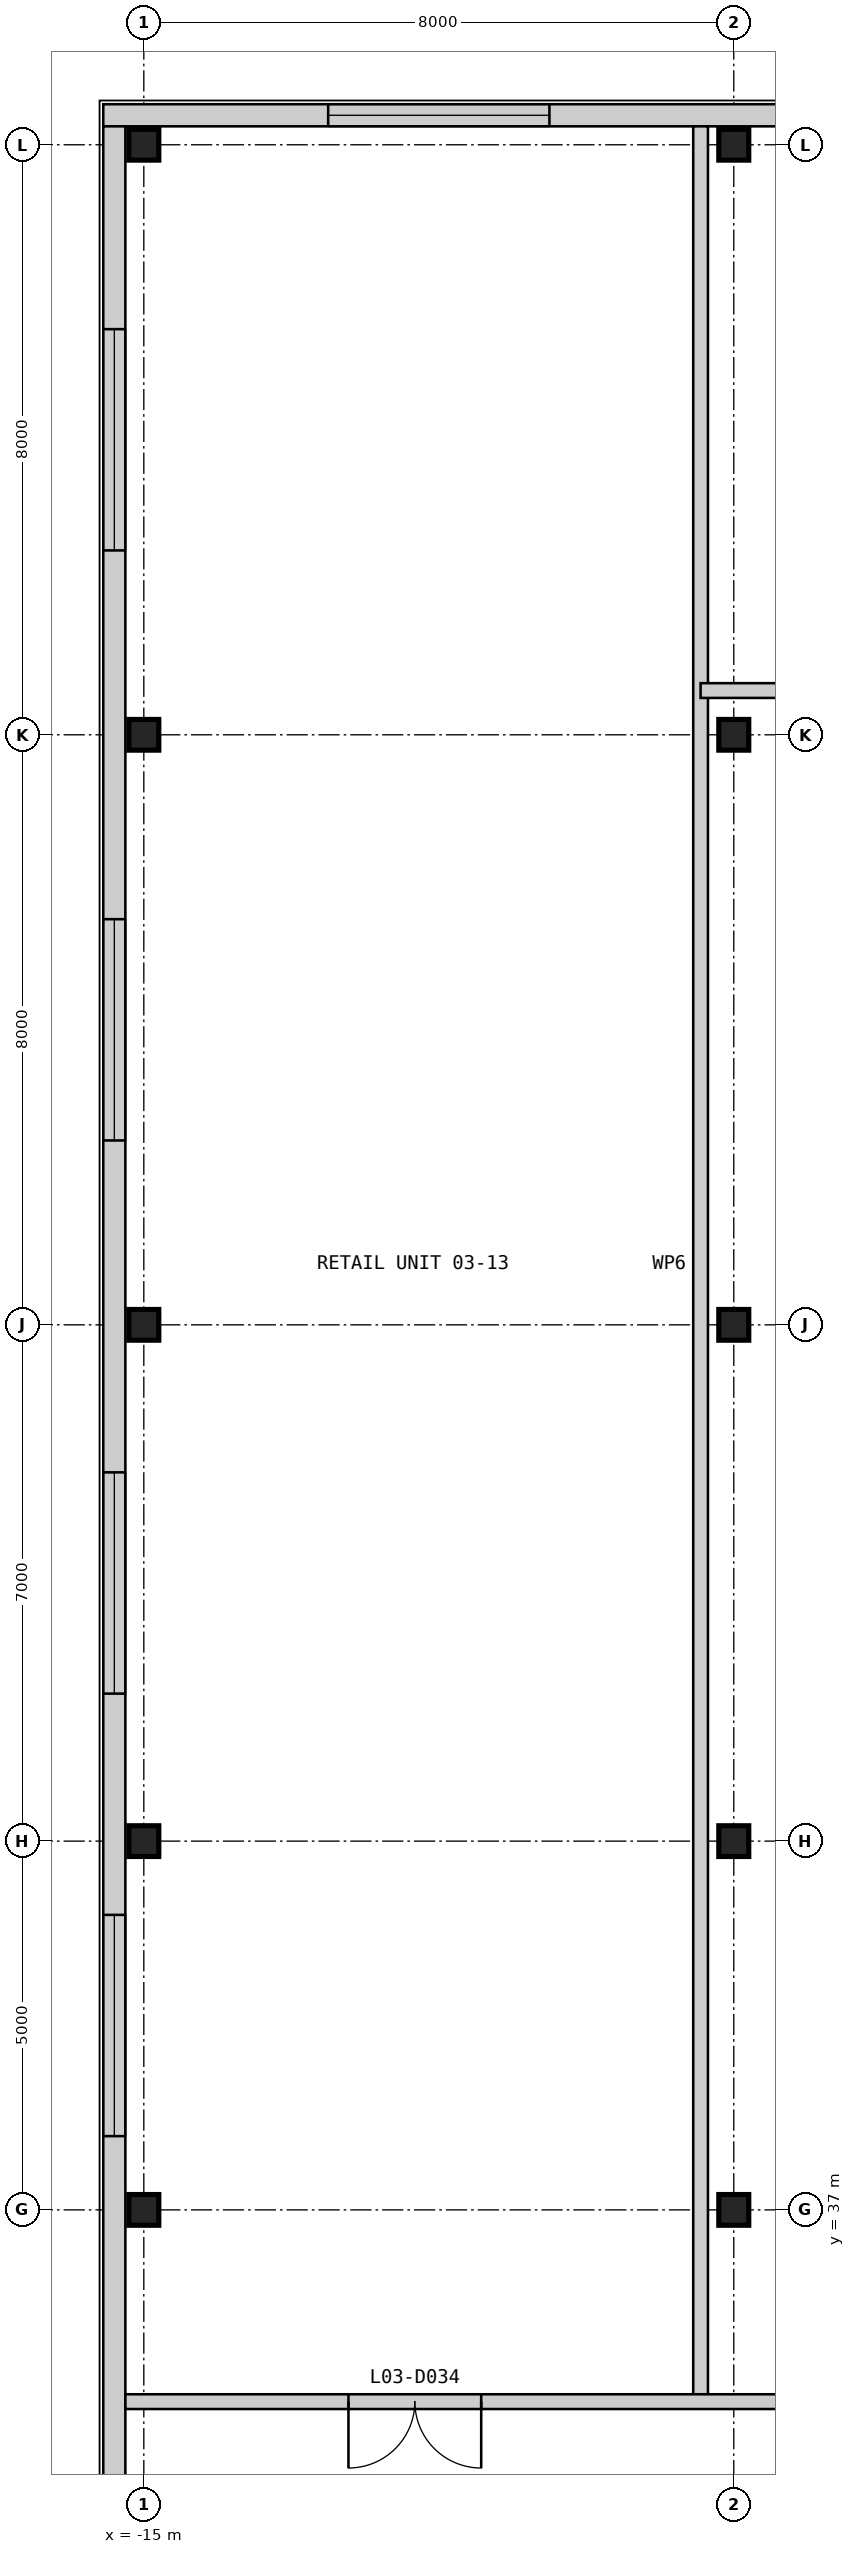
"""IFC4 building model, lengths in metres.
Left out: names, types, materials, properties, quantities, classifications, styles, units other than length and angle.
Written with IfcOpenShell. Run it as: python <this file> out.ifc"""

import sys

from ifc_helpers import new_model, si_unit, direction, frame, frame_2d, origin, origin_2d, place, context, subcontext, project, spatial, rectangle, i_section, extrude, element, fill, save


model = new_model("IFC4")
c1 = context("Model", 3, precision=1e-05, world=origin(), true_north=direction((0.0, 1.0)))
c2 = subcontext(c1, "Body", "Model", "MODEL_VIEW")
j1 = project(units=[si_unit("LENGTHUNIT", "METRE"), si_unit("PLANEANGLEUNIT", "RADIAN")], contexts=[c1])
p1 = place(None, origin())
s1 = spatial("IfcSite", under=j1, at=p1, CompositionType="ELEMENT")
p2 = place(p1, origin())
s2 = spatial("IfcBuilding", under=s1, at=p2, CompositionType="ELEMENT")
p3 = place(p2, frame((0.0, 0.0, 16.6)))
s3 = spatial("IfcBuildingStorey", under=s2, at=p3, CompositionType="ELEMENT", Elevation=16.6)
for number, where, z_axis, x_axis in (
    (1, (-15.0, 37.0, 0.0), (0.0, 0.0, 1.0), (1.0, 0.0, 0.0)),
    (2, (-15.0, 42.0, 0.0), (0.0, 0.0, 1.0), (1.0, 0.0, 0.0)),
    (3, (-15.0, 49.0, 0.0), (0.0, 0.0, 1.0), (1.0, 0.0, 0.0)),
    (4, (-15.0, 57.0, 0.0), (0.0, 0.0, 1.0), (1.0, 0.0, 0.0)),
    (5, (-15.0, 65.0, 0.0), (0.0, 0.0, 1.0), (1.0, 0.0, 0.0)),
    (6, (-7.0, 37.0, 0.0), (0.0, 0.0, 1.0), (1.0, 0.0, 0.0)),
    (7, (-7.0, 42.0, 0.0), (0.0, 0.0, 1.0), (1.0, 0.0, 0.0)),
    (8, (-7.0, 49.0, 0.0), (0.0, 0.0, 1.0), (1.0, 0.0, 0.0)),
    (9, (-7.0, 57.0, 0.0), (0.0, 0.0, 1.0), (1.0, 0.0, 0.0)),
    (10, (-7.0, 65.0, 0.0), (0.0, 0.0, 1.0), (1.0, 0.0, 0.0)),
):
    element("IfcColumn", number, at=place(p3, frame(where, z_axis=z_axis, x_axis=x_axis)), inside=s3, PredefinedType="COLUMN", context=c2, shape_type="SweptSolid", body=[
        extrude(i_section(OverallWidth=0.406, OverallDepth=0.417, WebThickness=0.03, FlangeThickness=0.048, at=origin_2d()), origin(), (0.0, 0.0, 1.0), 4.8),
    ])
p4 = place(p3, frame((57.55, 65.4, 0.0), z_axis=(0.0, 0.0, 1.0), x_axis=(-1.0, 0.0, 0.0)))
e11 = element("IfcWall", 11, at=p4, inside=s3, PredefinedType="SOLIDWALL", context=c2, shape_type="SweptSolid", body=[
    extrude(rectangle(XDim=73.1, YDim=0.3, at=frame_2d((36.55, 0.0))), origin(), (0.0, 0.0, 1.0), 4.5),
])
p5 = place(p4, frame((67.05, 0.0, 0.9)))
e12 = element("IfcOpeningElement", 12, at=p5, cuts=e11, PredefinedType="OPENING", context=c2, shape_type="SweptSolid", body=[
    extrude(rectangle(XDim=3.0, YDim=2.4, at=frame_2d((1.5, 1.2))), frame((0.0, 0.16, 0.0), z_axis=(0.0, -1.0, 0.0), x_axis=(1.0, 0.0, 0.0)), (0.0, 0.0, 1.0), 0.32),
])
p6 = place(p4, frame((59.05, 0.0, 0.9)))
e13 = element("IfcOpeningElement", 13, at=p6, cuts=e11, PredefinedType="OPENING", context=c2, shape_type="SweptSolid", body=[
    extrude(rectangle(XDim=3.0, YDim=2.4, at=frame_2d((1.5, 1.2))), frame((0.0, 0.16, 0.0), z_axis=(0.0, -1.0, 0.0), x_axis=(1.0, 0.0, 0.0)), (0.0, 0.0, 1.0), 0.32),
])
p7 = place(p4, frame((51.05, 0.0, 0.9)))
e14 = element("IfcOpeningElement", 14, at=p7, cuts=e11, PredefinedType="OPENING", context=c2, shape_type="SweptSolid", body=[
    extrude(rectangle(XDim=3.0, YDim=2.4, at=frame_2d((1.5, 1.2))), frame((0.0, 0.16, 0.0), z_axis=(0.0, -1.0, 0.0), x_axis=(1.0, 0.0, 0.0)), (0.0, 0.0, 1.0), 0.32),
])
p8 = place(p4, frame((37.05, 0.0, 0.9)))
e15 = element("IfcOpeningElement", 15, at=p8, cuts=e11, PredefinedType="OPENING", context=c2, shape_type="SweptSolid", body=[
    extrude(rectangle(XDim=3.0, YDim=2.4, at=frame_2d((1.5, 1.2))), frame((0.0, 0.16, 0.0), z_axis=(0.0, -1.0, 0.0), x_axis=(1.0, 0.0, 0.0)), (0.0, 0.0, 1.0), 0.32),
])
p9 = place(p4, frame((25.05, 0.0, 0.9)))
e16 = element("IfcOpeningElement", 16, at=p9, cuts=e11, PredefinedType="OPENING", context=c2, shape_type="SweptSolid", body=[
    extrude(rectangle(XDim=3.0, YDim=2.4, at=frame_2d((1.5, 1.2))), frame((0.0, 0.16, 0.0), z_axis=(0.0, -1.0, 0.0), x_axis=(1.0, 0.0, 0.0)), (0.0, 0.0, 1.0), 0.32),
])
p10 = place(p4, frame((16.55, 0.0, 0.9)))
e17 = element("IfcOpeningElement", 17, at=p10, cuts=e11, PredefinedType="OPENING", context=c2, shape_type="SweptSolid", body=[
    extrude(rectangle(XDim=3.0, YDim=2.4, at=frame_2d((1.5, 1.2))), frame((0.0, 0.16, 0.0), z_axis=(0.0, -1.0, 0.0), x_axis=(1.0, 0.0, 0.0)), (0.0, 0.0, 1.0), 0.32),
])
p11 = place(p4, frame((10.55, 0.0, 0.9)))
e18 = element("IfcOpeningElement", 18, at=p11, cuts=e11, PredefinedType="OPENING", context=c2, shape_type="SweptSolid", body=[
    extrude(rectangle(XDim=3.0, YDim=2.4, at=frame_2d((1.5, 1.2))), frame((0.0, 0.16, 0.0), z_axis=(0.0, -1.0, 0.0), x_axis=(1.0, 0.0, 0.0)), (0.0, 0.0, 1.0), 0.32),
])
p12 = place(p4, frame((3.05, 0.0, 0.9)))
e19 = element("IfcOpeningElement", 19, at=p12, cuts=e11, PredefinedType="OPENING", context=c2, shape_type="SweptSolid", body=[
    extrude(rectangle(XDim=3.0, YDim=2.4, at=frame_2d((1.5, 1.2))), frame((0.0, 0.16, 0.0), z_axis=(0.0, -1.0, 0.0), x_axis=(1.0, 0.0, 0.0)), (0.0, 0.0, 1.0), 0.32),
])
p13 = place(p3, frame((-15.4, 65.25, 0.0), z_axis=(0.0, 0.0, 1.0), x_axis=(0.0, -1.0, 0.0)))
e20 = element("IfcWall", 20, at=p13, inside=s3, PredefinedType="SOLIDWALL", context=c2, shape_type="SweptSolid", body=[
    extrude(rectangle(XDim=72.5, YDim=0.3, at=frame_2d((36.25, 0.0))), origin(), (0.0, 0.0, 1.0), 4.5),
])
p14 = place(p13, frame((66.75, 0.0, 0.9)))
e21 = element("IfcOpeningElement", 21, at=p14, cuts=e20, PredefinedType="OPENING", context=c2, shape_type="SweptSolid", body=[
    extrude(rectangle(XDim=3.0, YDim=2.4, at=frame_2d((1.5, 1.2))), frame((0.0, 0.16, 0.0), z_axis=(0.0, -1.0, 0.0), x_axis=(1.0, 0.0, 0.0)), (0.0, 0.0, 1.0), 0.32),
])
p15 = place(p13, frame((58.75, 0.0, 0.9)))
e22 = element("IfcOpeningElement", 22, at=p15, cuts=e20, PredefinedType="OPENING", context=c2, shape_type="SweptSolid", body=[
    extrude(rectangle(XDim=3.0, YDim=2.4, at=frame_2d((1.5, 1.2))), frame((0.0, 0.16, 0.0), z_axis=(0.0, -1.0, 0.0), x_axis=(1.0, 0.0, 0.0)), (0.0, 0.0, 1.0), 0.32),
])
p16 = place(p13, frame((44.75, 0.0, 0.9)))
e23 = element("IfcOpeningElement", 23, at=p16, cuts=e20, PredefinedType="OPENING", context=c2, shape_type="SweptSolid", body=[
    extrude(rectangle(XDim=3.0, YDim=2.4, at=frame_2d((1.5, 1.2))), frame((0.0, 0.16, 0.0), z_axis=(0.0, -1.0, 0.0), x_axis=(1.0, 0.0, 0.0)), (0.0, 0.0, 1.0), 0.32),
])
p17 = place(p13, frame((32.75, 0.0, 0.9)))
e24 = element("IfcOpeningElement", 24, at=p17, cuts=e20, PredefinedType="OPENING", context=c2, shape_type="SweptSolid", body=[
    extrude(rectangle(XDim=3.0, YDim=2.4, at=frame_2d((1.5, 1.2))), frame((0.0, 0.16, 0.0), z_axis=(0.0, -1.0, 0.0), x_axis=(1.0, 0.0, 0.0)), (0.0, 0.0, 1.0), 0.32),
])
p18 = place(p13, frame((24.25, 0.0, 0.9)))
e25 = element("IfcOpeningElement", 25, at=p18, cuts=e20, PredefinedType="OPENING", context=c2, shape_type="SweptSolid", body=[
    extrude(rectangle(XDim=3.0, YDim=2.4, at=frame_2d((1.5, 1.2))), frame((0.0, 0.16, 0.0), z_axis=(0.0, -1.0, 0.0), x_axis=(1.0, 0.0, 0.0)), (0.0, 0.0, 1.0), 0.32),
])
p19 = place(p13, frame((18.25, 0.0, 0.9)))
e26 = element("IfcOpeningElement", 26, at=p19, cuts=e20, PredefinedType="OPENING", context=c2, shape_type="SweptSolid", body=[
    extrude(rectangle(XDim=3.0, YDim=2.4, at=frame_2d((1.5, 1.2))), frame((0.0, 0.16, 0.0), z_axis=(0.0, -1.0, 0.0), x_axis=(1.0, 0.0, 0.0)), (0.0, 0.0, 1.0), 0.32),
])
p20 = place(p13, frame((10.75, 0.0, 0.9)))
e27 = element("IfcOpeningElement", 27, at=p20, cuts=e20, PredefinedType="OPENING", context=c2, shape_type="SweptSolid", body=[
    extrude(rectangle(XDim=3.0, YDim=2.4, at=frame_2d((1.5, 1.2))), frame((0.0, 0.16, 0.0), z_axis=(0.0, -1.0, 0.0), x_axis=(1.0, 0.0, 0.0)), (0.0, 0.0, 1.0), 0.32),
])
p21 = place(p13, frame((2.75, 0.0, 0.9)))
e28 = element("IfcOpeningElement", 28, at=p21, cuts=e20, PredefinedType="OPENING", context=c2, shape_type="SweptSolid", body=[
    extrude(rectangle(XDim=3.0, YDim=2.4, at=frame_2d((1.5, 1.2))), frame((0.0, 0.16, 0.0), z_axis=(0.0, -1.0, 0.0), x_axis=(1.0, 0.0, 0.0)), (0.0, 0.0, 1.0), 0.32),
])
p22 = place(p3, frame((-7.45, 34.4, 0.0), z_axis=(0.0, 0.0, 1.0), x_axis=(0.0, 1.0, 0.0)))
e29 = element("IfcWall", 29, at=p22, inside=s3, PredefinedType="PARTITIONING", context=c2, shape_type="SweptSolid", body=[
    extrude(rectangle(XDim=30.85, YDim=0.2, at=frame_2d((15.425, 0.0))), origin(), (0.0, 0.0, 1.0), 4.5),
])
p23 = place(p3, frame((-15.25, 34.4, 0.0), z_axis=(0.0, 0.0, 1.0), x_axis=(1.0, 0.0, 0.0)))
e30 = element("IfcWall", 30, at=p23, inside=s3, PredefinedType="PARTITIONING", context=c2, shape_type="SweptSolid", body=[
    extrude(rectangle(XDim=22.25, YDim=0.2, at=frame_2d((11.125, 0.0))), origin(), (0.0, 0.0, 1.0), 4.5),
])
p24 = place(p23, frame((17.525, 0.0, 0.0)))
e31 = element("IfcOpeningElement", 31, at=p24, cuts=e30, PredefinedType="OPENING", context=c2, shape_type="SweptSolid", body=[
    extrude(rectangle(XDim=1.8, YDim=2.4, at=frame_2d((0.9, 1.2))), frame((0.0, 0.11, 0.0), z_axis=(0.0, -1.0, 0.0), x_axis=(1.0, 0.0, 0.0)), (0.0, 0.0, 1.0), 0.22),
])
p25 = place(p23, frame((10.325, 0.0, 0.0)))
e32 = element("IfcOpeningElement", 32, at=p25, cuts=e30, PredefinedType="OPENING", context=c2, shape_type="SweptSolid", body=[
    extrude(rectangle(XDim=1.8, YDim=2.4, at=frame_2d((0.9, 1.2))), frame((0.0, 0.11, 0.0), z_axis=(0.0, -1.0, 0.0), x_axis=(1.0, 0.0, 0.0)), (0.0, 0.0, 1.0), 0.22),
])
p26 = place(p23, frame((3.025, 0.0, 0.0)))
e33 = element("IfcOpeningElement", 33, at=p26, cuts=e30, PredefinedType="OPENING", context=c2, shape_type="SweptSolid", body=[
    extrude(rectangle(XDim=1.8, YDim=2.4, at=frame_2d((0.9, 1.2))), frame((0.0, 0.11, 0.0), z_axis=(0.0, -1.0, 0.0), x_axis=(1.0, 0.0, 0.0)), (0.0, 0.0, 1.0), 0.22),
])
p27 = place(p3, frame((-7.45, 57.6, 0.0), z_axis=(0.0, 0.0, 1.0), x_axis=(1.0, 0.0, 0.0)))
e34 = element("IfcWall", 34, at=p27, inside=s3, PredefinedType="PARTITIONING", context=c2, shape_type="SweptSolid", body=[
    extrude(rectangle(XDim=19.05, YDim=0.2, at=frame_2d((9.525, 0.0))), origin(), (0.0, 0.0, 1.0), 4.5),
])
p28 = place(p5, origin())
e35 = element("IfcWindow", 35, at=p28, inside=s3, PartitioningType="SINGLE_PANEL", PredefinedType="WINDOW", context=c2, shape_type="SweptSolid", body=[
    extrude(rectangle(XDim=3.0, YDim=2.4, at=frame_2d((1.5, 1.2))), frame((0.0, 0.03, 0.0), z_axis=(0.0, -1.0, 0.0), x_axis=(1.0, 0.0, 0.0)), (0.0, 0.0, 1.0), 0.06),
])
fill(e12, e35)
p29 = place(p18, origin())
e36 = element("IfcWindow", 36, at=p29, inside=s3, PartitioningType="SINGLE_PANEL", PredefinedType="WINDOW", context=c2, shape_type="SweptSolid", body=[
    extrude(rectangle(XDim=3.0, YDim=2.4, at=frame_2d((1.5, 1.2))), frame((0.0, 0.03, 0.0), z_axis=(0.0, -1.0, 0.0), x_axis=(1.0, 0.0, 0.0)), (0.0, 0.0, 1.0), 0.06),
])
fill(e25, e36)
p30 = place(p19, origin())
e37 = element("IfcWindow", 37, at=p30, inside=s3, PartitioningType="SINGLE_PANEL", PredefinedType="WINDOW", context=c2, shape_type="SweptSolid", body=[
    extrude(rectangle(XDim=3.0, YDim=2.4, at=frame_2d((1.5, 1.2))), frame((0.0, 0.03, 0.0), z_axis=(0.0, -1.0, 0.0), x_axis=(1.0, 0.0, 0.0)), (0.0, 0.0, 1.0), 0.06),
])
fill(e26, e37)
p31 = place(p20, origin())
e38 = element("IfcWindow", 38, at=p31, inside=s3, PartitioningType="SINGLE_PANEL", PredefinedType="WINDOW", context=c2, shape_type="SweptSolid", body=[
    extrude(rectangle(XDim=3.0, YDim=2.4, at=frame_2d((1.5, 1.2))), frame((0.0, 0.03, 0.0), z_axis=(0.0, -1.0, 0.0), x_axis=(1.0, 0.0, 0.0)), (0.0, 0.0, 1.0), 0.06),
])
fill(e27, e38)
p32 = place(p21, origin())
e39 = element("IfcWindow", 39, at=p32, inside=s3, PartitioningType="SINGLE_PANEL", PredefinedType="WINDOW", context=c2, shape_type="SweptSolid", body=[
    extrude(rectangle(XDim=3.0, YDim=2.4, at=frame_2d((1.5, 1.2))), frame((0.0, 0.03, 0.0), z_axis=(0.0, -1.0, 0.0), x_axis=(1.0, 0.0, 0.0)), (0.0, 0.0, 1.0), 0.06),
])
fill(e28, e39)
p33 = place(p26, frame((1.8, 0.0, 0.0), z_axis=(0.0, 0.0, 1.0), x_axis=(-1.0, 0.0, 0.0)))
e40 = element("IfcDoor", 40, at=p33, inside=s3, OperationType="DOUBLE_DOOR_SINGLE_SWING", PredefinedType="DOOR", context=c2, shape_type="SweptSolid", body=[
    extrude(rectangle(XDim=1.8, YDim=2.4, at=frame_2d((0.9, 1.2))), frame((0.0, 0.025, 0.0), z_axis=(0.0, -1.0, 0.0), x_axis=(1.0, 0.0, 0.0)), (0.0, 0.0, 1.0), 0.05),
])
fill(e33, e40)
save(model, sys.argv[1])
